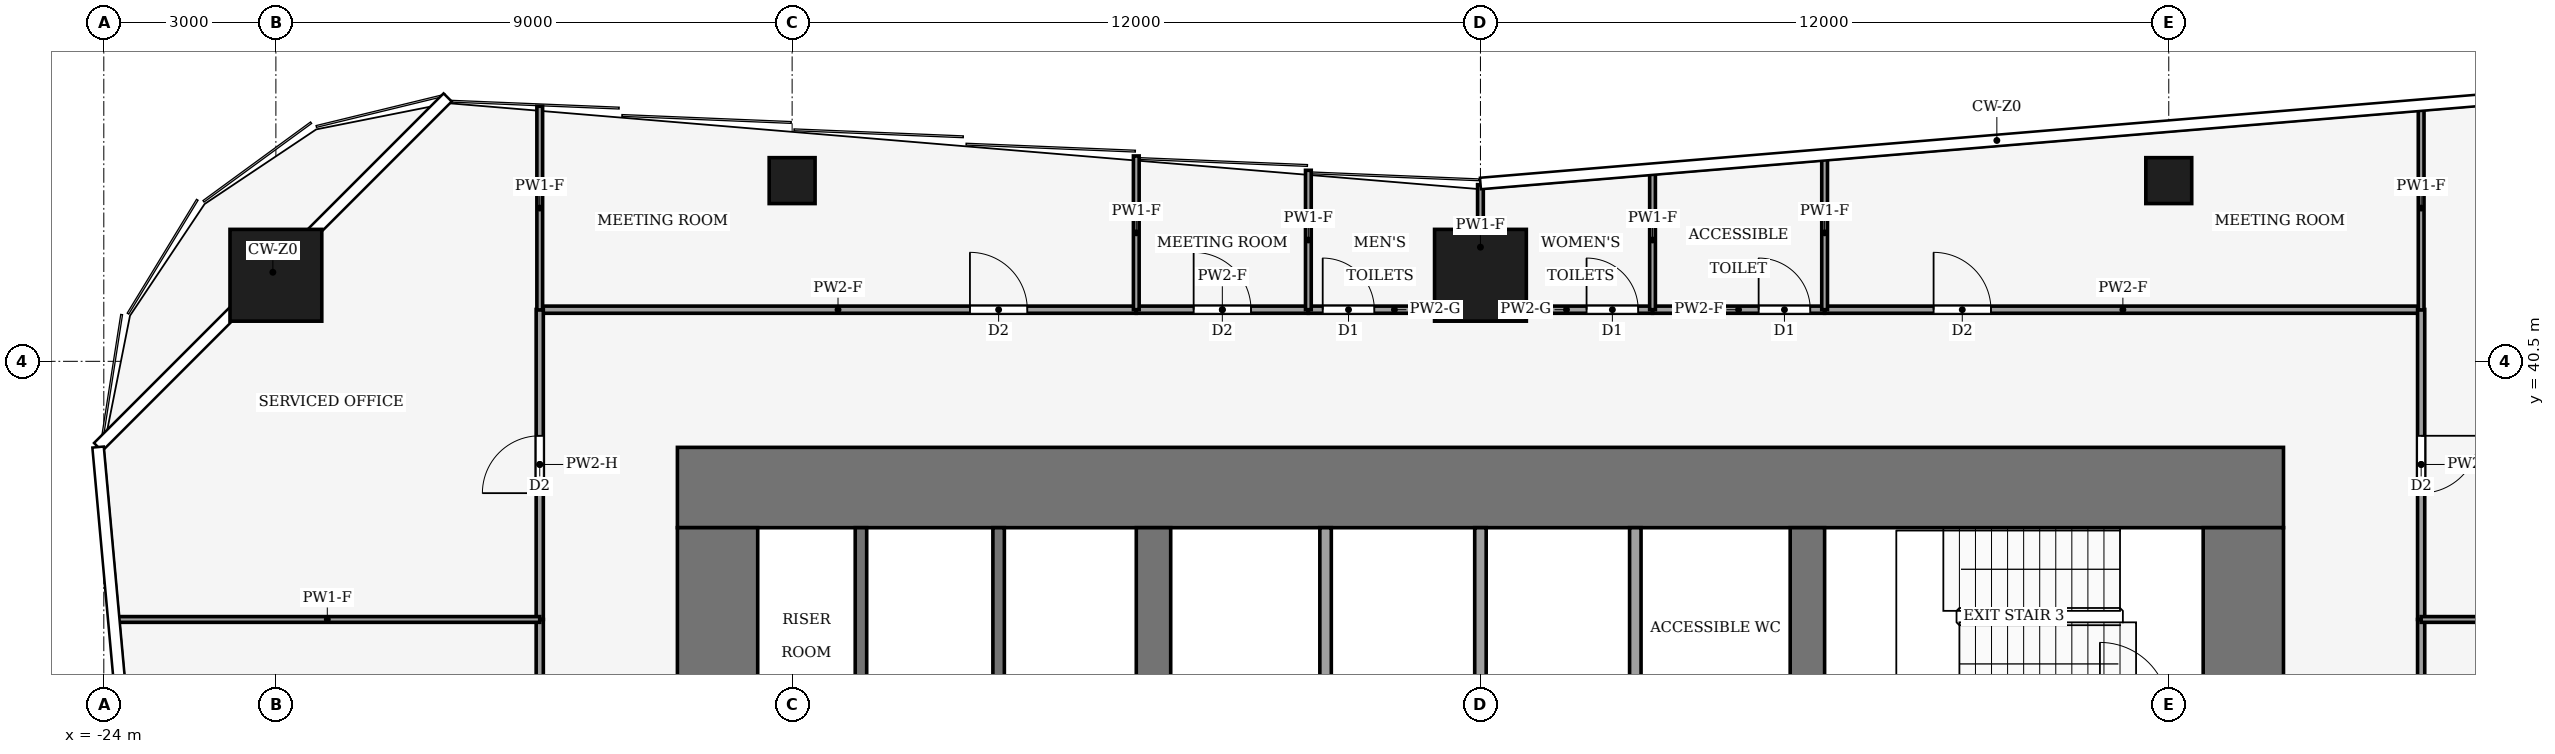
"""IFC4 building model, lengths in metres.
Left out: names, types, materials, properties, quantities, classifications, styles, units other than length and angle.
Written with IfcOpenShell. Run it as: python <this file> out.ifc"""

import sys

from ifc_helpers import new_model, si_unit, direction, frame, frame_2d, origin, origin_2d, place, context, subcontext, project, spatial, rectangle, hollow_rectangle, extrude, element, fill, save


model = new_model("IFC4")
c1 = context("Model", 3, precision=1e-05, world=origin(), true_north=direction((0.0, 1.0)))
c2 = subcontext(c1, "Body", "Model", "MODEL_VIEW")
j1 = project(units=[si_unit("LENGTHUNIT", "METRE"), si_unit("PLANEANGLEUNIT", "RADIAN")], contexts=[c1])
p1 = place(None, origin())
s1 = spatial("IfcSite", under=j1, at=p1, CompositionType="ELEMENT")
p2 = place(p1, origin())
s2 = spatial("IfcBuilding", under=s1, at=p2, CompositionType="ELEMENT")
p3 = place(p2, frame((0.0, 0.0, 30.0)))
s3 = spatial("IfcBuildingStorey", under=s2, at=p3, CompositionType="ELEMENT", Elevation=30.0)
p4 = place(p3, frame((-14.0, 38.3, -0.13), z_axis=(0.0, 0.0, 1.0), x_axis=(1.0, 0.0, 0.0)))
e1 = element("IfcWall", 1, at=p4, inside=s3, PredefinedType="SHEAR", context=c2, shape_type="SweptSolid", body=[
    extrude(rectangle(XDim=28.0, YDim=1.4, at=frame_2d((14.0, 0.0))), origin(), (0.0, 0.0, 1.0), 4.0),
])
p5 = place(p3, frame((-13.3, 18.4, -0.13), z_axis=(0.0, 0.0, 1.0), x_axis=(0.0, 1.0, 0.0)))
e2 = element("IfcWall", 2, at=p5, inside=s3, PredefinedType="SHEAR", context=c2, shape_type="SweptSolid", body=[
    extrude(rectangle(XDim=19.2, YDim=1.4, at=frame_2d((9.6, 0.0))), origin(), (0.0, 0.0, 1.0), 4.0),
])
p6 = place(p5, frame((2.8, 0.0, 0.13)))
e3 = element("IfcOpeningElement", 3, at=p6, cuts=e2, PredefinedType="OPENING", context=c2, shape_type="SweptSolid", body=[
    extrude(rectangle(XDim=2.4, YDim=2.4, at=frame_2d((1.2, 1.2))), frame((0.0, 0.71, 0.0), z_axis=(0.0, -1.0, 0.0), x_axis=(1.0, 0.0, 0.0)), (0.0, 0.0, 1.0), 1.42),
])
p7 = place(p5, frame((13.4, 0.0, 0.13)))
e4 = element("IfcOpeningElement", 4, at=p7, cuts=e2, PredefinedType="OPENING", context=c2, shape_type="SweptSolid", body=[
    extrude(rectangle(XDim=1.4, YDim=2.2, at=frame_2d((0.7, 1.1))), frame((0.0, 0.71, 0.0), z_axis=(0.0, -1.0, 0.0), x_axis=(1.0, 0.0, 0.0)), (0.0, 0.0, 1.0), 1.42),
])
p8 = place(p3, frame((13.3, 18.4, -0.13), z_axis=(0.0, 0.0, 1.0), x_axis=(0.0, 1.0, 0.0)))
e5 = element("IfcWall", 5, at=p8, inside=s3, PredefinedType="SHEAR", context=c2, shape_type="SweptSolid", body=[
    extrude(rectangle(XDim=19.2, YDim=1.4, at=frame_2d((9.6, 0.0))), origin(), (0.0, 0.0, 1.0), 4.0),
])
p9 = place(p8, frame((2.8, 0.0, 0.13)))
e6 = element("IfcOpeningElement", 6, at=p9, cuts=e5, PredefinedType="OPENING", context=c2, shape_type="SweptSolid", body=[
    extrude(rectangle(XDim=2.4, YDim=2.4, at=frame_2d((1.2, 1.2))), frame((0.0, 0.71, 0.0), z_axis=(0.0, -1.0, 0.0), x_axis=(1.0, 0.0, 0.0)), (0.0, 0.0, 1.0), 1.42),
])
p10 = place(p8, frame((13.3, 0.0, 0.13)))
e7 = element("IfcOpeningElement", 7, at=p10, cuts=e5, PredefinedType="OPENING", context=c2, shape_type="SweptSolid", body=[
    extrude(rectangle(XDim=2.4, YDim=2.4, at=frame_2d((1.2, 1.2))), frame((0.0, 0.71, 0.0), z_axis=(0.0, -1.0, 0.0), x_axis=(1.0, 0.0, 0.0)), (0.0, 0.0, 1.0), 1.42),
])
p11 = place(p3, frame((-5.7, 18.4, -0.13), z_axis=(0.0, 0.0, 1.0), x_axis=(0.0, 1.0, 0.0)))
e8 = element("IfcWall", 8, at=p11, inside=s3, PredefinedType="SHEAR", context=c2, shape_type="SweptSolid", body=[
    extrude(rectangle(XDim=19.2, YDim=0.6, at=frame_2d((9.6, 0.0))), origin(), (0.0, 0.0, 1.0), 4.0),
])
p12 = place(p11, frame((8.35, 0.0, 0.13)))
e9 = element("IfcOpeningElement", 9, at=p12, cuts=e8, PredefinedType="OPENING", context=c2, shape_type="SweptSolid", body=[
    extrude(rectangle(XDim=0.9, YDim=2.1, at=frame_2d((0.45, 1.05))), frame((0.0, 0.31, 0.0), z_axis=(0.0, -1.0, 0.0), x_axis=(1.0, 0.0, 0.0)), (0.0, 0.0, 1.0), 0.62),
])
p13 = place(p3, frame((5.7, 18.4, -0.13), z_axis=(0.0, 0.0, 1.0), x_axis=(0.0, 1.0, 0.0)))
e10 = element("IfcWall", 10, at=p13, inside=s3, PredefinedType="SHEAR", context=c2, shape_type="SweptSolid", body=[
    extrude(rectangle(XDim=19.2, YDim=0.6, at=frame_2d((9.6, 0.0))), origin(), (0.0, 0.0, 1.0), 4.0),
])
p14 = place(p13, frame((13.3, 0.0, 0.13)))
e11 = element("IfcOpeningElement", 11, at=p14, cuts=e10, PredefinedType="OPENING", context=c2, shape_type="SweptSolid", body=[
    extrude(rectangle(XDim=2.4, YDim=2.4, at=frame_2d((1.2, 1.2))), frame((0.0, 0.31, 0.0), z_axis=(0.0, -1.0, 0.0), x_axis=(1.0, 0.0, 0.0)), (0.0, 0.0, 1.0), 0.62),
])
for number, where, z_axis, x_axis in (
    (12, (-21.0, 42.0, 0.0), (0.0, 0.0, 1.0), (1.0, 0.0, 0.0)),
    (13, (0.0, 42.0, 0.0), (0.0, 0.0, 1.0), (1.0, 0.0, 0.0)),
):
    element("IfcColumn", number, at=place(p3, frame(where, z_axis=z_axis, x_axis=x_axis)), inside=s3, PredefinedType="COLUMN", context=c2, shape_type="SweptSolid", body=[
        extrude(hollow_rectangle(XDim=1.6, YDim=1.6, WallThickness=0.09, at=origin_2d()), origin(), (0.0, 0.0, 1.0), 4.0),
    ])
for number, where, z_axis, x_axis in (
    (14, (-12.0, 43.65, 0.0), (0.0, 0.0, 1.0), (1.0, 0.0, 0.0)),
    (15, (12.0, 43.65, 0.0), (0.0, 0.0, 1.0), (1.0, 0.0, 0.0)),
):
    element("IfcColumn", number, at=place(p3, frame(where, z_axis=z_axis, x_axis=x_axis)), inside=s3, PredefinedType="COLUMN", context=c2, shape_type="SweptSolid", body=[
        extrude(hollow_rectangle(XDim=0.8, YDim=0.8, WallThickness=0.04, at=origin_2d()), origin(), (0.0, 0.0, 1.0), 4.0),
    ])
for number, where, z_axis, x_axis in (
    (16, (-10.8, 34.0, 0.0), (0.0, 0.0, 1.0), (0.0, 1.0, 0.0)),
    (17, (-8.4, 34.0, 0.0), (0.0, 0.0, 1.0), (0.0, 1.0, 0.0)),
    (18, (-2.7, 34.0, 0.0), (0.0, 0.0, 1.0), (0.0, 1.0, 0.0)),
    (19, (0.0, 34.0, 0.0), (0.0, 0.0, 1.0), (0.0, 1.0, 0.0)),
    (20, (2.7, 34.0, 0.0), (0.0, 0.0, 1.0), (0.0, 1.0, 0.0)),
):
    element("IfcWall", number, at=place(p3, frame(where, z_axis=z_axis, x_axis=x_axis)), inside=s3, PredefinedType="PARTITIONING", context=c2, shape_type="SweptSolid", body=[
        extrude(rectangle(XDim=3.6, YDim=0.2, at=frame_2d((1.8, 0.0))), origin(), (0.0, 0.0, 1.0), 3.87),
    ])
p15 = place(p3, frame((-16.4, 41.4, 0.0), z_axis=(0.0, 0.0, 1.0), x_axis=(1.0, 0.0, 0.0)))
e21 = element("IfcWall", 21, at=p15, inside=s3, PredefinedType="PARTITIONING", context=c2, shape_type="SweptSolid", body=[
    extrude(rectangle(XDim=10.4, YDim=0.125, at=frame_2d((5.2, 0.0))), origin(), (0.0, 0.0, 1.0), 3.54),
])
p16 = place(p15, frame((7.5, 0.0, 0.0)))
e22 = element("IfcOpeningElement", 22, at=p16, cuts=e21, PredefinedType="OPENING", context=c2, shape_type="SweptSolid", body=[
    extrude(rectangle(XDim=1.0, YDim=2.1, at=frame_2d((0.5, 1.05))), frame((0.0, 0.073, 0.0), z_axis=(0.0, -1.0, 0.0), x_axis=(1.0, 0.0, 0.0)), (0.0, 0.0, 1.0), 0.145),
])
p17 = place(p3, frame((-6.0, 41.4, 0.0), z_axis=(0.0, 0.0, 1.0), x_axis=(1.0, 0.0, 0.0)))
e23 = element("IfcWall", 23, at=p17, inside=s3, PredefinedType="PARTITIONING", context=c2, shape_type="SweptSolid", body=[
    extrude(rectangle(XDim=3.0, YDim=0.125, at=frame_2d((1.5, 0.0))), origin(), (0.0, 0.0, 1.0), 3.54),
])
p18 = place(p17, frame((1.0, 0.0, 0.0)))
e24 = element("IfcOpeningElement", 24, at=p18, cuts=e23, PredefinedType="OPENING", context=c2, shape_type="SweptSolid", body=[
    extrude(rectangle(XDim=1.0, YDim=2.1, at=frame_2d((0.5, 1.05))), frame((0.0, 0.073, 0.0), z_axis=(0.0, -1.0, 0.0), x_axis=(1.0, 0.0, 0.0)), (0.0, 0.0, 1.0), 0.145),
])
p19 = place(p3, frame((-3.0, 41.4, 0.0), z_axis=(0.0, 0.0, 1.0), x_axis=(1.0, 0.0, 0.0)))
e25 = element("IfcWall", 25, at=p19, inside=s3, PredefinedType="PARTITIONING", context=c2, shape_type="SweptSolid", body=[
    extrude(rectangle(XDim=3.0, YDim=0.125, at=frame_2d((1.5, 0.0))), origin(), (0.0, 0.0, 1.0), 3.87),
])
p20 = place(p19, frame((0.25, 0.0, 0.0)))
e26 = element("IfcOpeningElement", 26, at=p20, cuts=e25, PredefinedType="OPENING", context=c2, shape_type="SweptSolid", body=[
    extrude(rectangle(XDim=0.9, YDim=2.1, at=frame_2d((0.45, 1.05))), frame((0.0, 0.073, 0.0), z_axis=(0.0, -1.0, 0.0), x_axis=(1.0, 0.0, 0.0)), (0.0, 0.0, 1.0), 0.145),
])
p21 = place(p3, frame((0.0, 41.4, 0.0), z_axis=(0.0, 0.0, 1.0), x_axis=(1.0, 0.0, 0.0)))
e27 = element("IfcWall", 27, at=p21, inside=s3, PredefinedType="PARTITIONING", context=c2, shape_type="SweptSolid", body=[
    extrude(rectangle(XDim=3.0, YDim=0.125, at=frame_2d((1.5, 0.0))), origin(), (0.0, 0.0, 1.0), 3.87),
])
p22 = place(p21, frame((1.85, 0.0, 0.0)))
e28 = element("IfcOpeningElement", 28, at=p22, cuts=e27, PredefinedType="OPENING", context=c2, shape_type="SweptSolid", body=[
    extrude(rectangle(XDim=0.9, YDim=2.1, at=frame_2d((0.45, 1.05))), frame((0.0, 0.073, 0.0), z_axis=(0.0, -1.0, 0.0), x_axis=(1.0, 0.0, 0.0)), (0.0, 0.0, 1.0), 0.145),
])
p23 = place(p3, frame((3.0, 41.4, 0.0), z_axis=(0.0, 0.0, 1.0), x_axis=(1.0, 0.0, 0.0)))
e29 = element("IfcWall", 29, at=p23, inside=s3, PredefinedType="PARTITIONING", context=c2, shape_type="SweptSolid", body=[
    extrude(rectangle(XDim=3.0, YDim=0.125, at=frame_2d((1.5, 0.0))), origin(), (0.0, 0.0, 1.0), 3.54),
])
p24 = place(p23, frame((1.85, 0.0, 0.0)))
e30 = element("IfcOpeningElement", 30, at=p24, cuts=e29, PredefinedType="OPENING", context=c2, shape_type="SweptSolid", body=[
    extrude(rectangle(XDim=0.9, YDim=2.1, at=frame_2d((0.45, 1.05))), frame((0.0, 0.073, 0.0), z_axis=(0.0, -1.0, 0.0), x_axis=(1.0, 0.0, 0.0)), (0.0, 0.0, 1.0), 0.145),
])
p25 = place(p3, frame((6.0, 41.4, 0.0), z_axis=(0.0, 0.0, 1.0), x_axis=(1.0, 0.0, 0.0)))
e31 = element("IfcWall", 31, at=p25, inside=s3, PredefinedType="PARTITIONING", context=c2, shape_type="SweptSolid", body=[
    extrude(rectangle(XDim=10.4, YDim=0.125, at=frame_2d((5.2, 0.0))), origin(), (0.0, 0.0, 1.0), 3.54),
])
p26 = place(p25, frame((1.9, 0.0, 0.0)))
e32 = element("IfcOpeningElement", 32, at=p26, cuts=e31, PredefinedType="OPENING", context=c2, shape_type="SweptSolid", body=[
    extrude(rectangle(XDim=1.0, YDim=2.1, at=frame_2d((0.5, 1.05))), frame((0.0, 0.073, 0.0), z_axis=(0.0, -1.0, 0.0), x_axis=(1.0, 0.0, 0.0)), (0.0, 0.0, 1.0), 0.145),
])
p27 = place(p3, frame((-16.4, 24.0, 0.0), z_axis=(0.0, 0.0, 1.0), x_axis=(0.0, 1.0, 0.0)))
e33 = element("IfcWall", 33, at=p27, inside=s3, PredefinedType="PARTITIONING", context=c2, shape_type="SweptSolid", body=[
    extrude(rectangle(XDim=12.0, YDim=0.125, at=frame_2d((6.0, 0.0))), origin(), (0.0, 0.0, 1.0), 3.48),
])
p28 = place(p27, frame((5.5, 0.0, 0.0)))
e34 = element("IfcOpeningElement", 34, at=p28, cuts=e33, PredefinedType="OPENING", context=c2, shape_type="SweptSolid", body=[
    extrude(rectangle(XDim=1.0, YDim=2.1, at=frame_2d((0.5, 1.05))), frame((0.0, 0.073, 0.0), z_axis=(0.0, -1.0, 0.0), x_axis=(1.0, 0.0, 0.0)), (0.0, 0.0, 1.0), 0.145),
])
p29 = place(p3, frame((-16.4, 36.0, 0.0), z_axis=(0.0, 0.0, 1.0), x_axis=(0.0, 1.0, 0.0)))
e35 = element("IfcWall", 35, at=p29, inside=s3, PredefinedType="PARTITIONING", context=c2, shape_type="SweptSolid", body=[
    extrude(rectangle(XDim=5.404, YDim=0.125, at=frame_2d((2.702, 0.0))), origin(), (0.0, 0.0, 1.0), 3.14),
])
p30 = place(p29, frame((2.202, 0.0, 0.0)))
e36 = element("IfcOpeningElement", 36, at=p30, cuts=e35, PredefinedType="OPENING", context=c2, shape_type="SweptSolid", body=[
    extrude(rectangle(XDim=1.0, YDim=2.1, at=frame_2d((0.5, 1.05))), frame((0.0, 0.073, 0.0), z_axis=(0.0, -1.0, 0.0), x_axis=(1.0, 0.0, 0.0)), (0.0, 0.0, 1.0), 0.145),
])
p31 = place(p3, frame((16.4, 36.0, 0.0), z_axis=(0.0, 0.0, 1.0), x_axis=(0.0, -1.0, 0.0)))
e37 = element("IfcWall", 37, at=p31, inside=s3, PredefinedType="PARTITIONING", context=c2, shape_type="SweptSolid", body=[
    extrude(rectangle(XDim=3.0, YDim=0.125, at=frame_2d((1.5, 0.0))), origin(), (0.0, 0.0, 1.0), 3.48),
])
p32 = place(p31, frame((1.0, 0.0, 0.0)))
e38 = element("IfcOpeningElement", 38, at=p32, cuts=e37, PredefinedType="OPENING", context=c2, shape_type="SweptSolid", body=[
    extrude(rectangle(XDim=1.0, YDim=2.1, at=frame_2d((0.5, 1.05))), frame((0.0, 0.073, 0.0), z_axis=(0.0, -1.0, 0.0), x_axis=(1.0, 0.0, 0.0)), (0.0, 0.0, 1.0), 0.145),
])
p33 = place(p3, frame((16.4, 41.404, 0.0), z_axis=(0.0, 0.0, 1.0), x_axis=(0.0, -1.0, 0.0)))
e39 = element("IfcWall", 39, at=p33, inside=s3, PredefinedType="PARTITIONING", context=c2, shape_type="SweptSolid", body=[
    extrude(rectangle(XDim=5.404, YDim=0.125, at=frame_2d((2.702, 0.0))), origin(), (0.0, 0.0, 1.0), 3.14),
])
p34 = place(p33, frame((2.202, 0.0, 0.0)))
e40 = element("IfcOpeningElement", 40, at=p34, cuts=e39, PredefinedType="OPENING", context=c2, shape_type="SweptSolid", body=[
    extrude(rectangle(XDim=1.0, YDim=2.1, at=frame_2d((0.5, 1.05))), frame((0.0, 0.073, 0.0), z_axis=(0.0, -1.0, 0.0), x_axis=(1.0, 0.0, 0.0)), (0.0, 0.0, 1.0), 0.145),
])
p35 = place(p3, frame((-6.0, 41.4, 0.0), z_axis=(0.0, 0.0, 1.0), x_axis=(0.0, 1.0, 0.0)))
e41 = element("IfcWall", 41, at=p35, inside=s3, PredefinedType="PARTITIONING", context=c2, shape_type="SweptSolid", body=[
    extrude(rectangle(XDim=2.68, YDim=0.1, at=frame_2d((1.34, 0.0))), origin(), (0.0, 0.0, 1.0), 3.04),
])
p36 = place(p3, frame((-16.4, 44.947, 0.0), z_axis=(0.0, 0.0, 1.0), x_axis=(0.0, -1.0, 0.0)))
e42 = element("IfcWall", 42, at=p36, inside=s3, PredefinedType="PARTITIONING", context=c2, shape_type="SweptSolid", body=[
    extrude(rectangle(XDim=3.551, YDim=0.1, at=frame_2d((1.775, 0.0))), origin(), (0.0, 0.0, 1.0), 3.04),
])
p37 = place(p3, frame((-3.0, 41.4, 0.0), z_axis=(0.0, 0.0, 1.0), x_axis=(0.0, 1.0, 0.0)))
e43 = element("IfcWall", 43, at=p37, inside=s3, PredefinedType="PARTITIONING", context=c2, shape_type="SweptSolid", body=[
    extrude(rectangle(XDim=2.43, YDim=0.1, at=frame_2d((1.215, 0.0))), origin(), (0.0, 0.0, 1.0), 3.04),
])
p38 = place(p3, frame((0.0, 41.4, 0.0), z_axis=(0.0, 0.0, 1.0), x_axis=(0.0, 1.0, 0.0)))
e44 = element("IfcWall", 44, at=p38, inside=s3, PredefinedType="PARTITIONING", context=c2, shape_type="SweptSolid", body=[
    extrude(rectangle(XDim=2.18, YDim=0.1, at=frame_2d((1.09, 0.0))), origin(), (0.0, 0.0, 1.0), 3.04),
])
p39 = place(p3, frame((3.0, 41.4, 0.0), z_axis=(0.0, 0.0, 1.0), x_axis=(0.0, 1.0, 0.0)))
e45 = element("IfcWall", 45, at=p39, inside=s3, PredefinedType="PARTITIONING", context=c2, shape_type="SweptSolid", body=[
    extrude(rectangle(XDim=2.43, YDim=0.1, at=frame_2d((1.215, 0.0))), origin(), (0.0, 0.0, 1.0), 3.04),
])
p40 = place(p3, frame((6.0, 41.4, 0.0), z_axis=(0.0, 0.0, 1.0), x_axis=(0.0, 1.0, 0.0)))
e46 = element("IfcWall", 46, at=p40, inside=s3, PredefinedType="PARTITIONING", context=c2, shape_type="SweptSolid", body=[
    extrude(rectangle(XDim=2.68, YDim=0.1, at=frame_2d((1.34, 0.0))), origin(), (0.0, 0.0, 1.0), 3.04),
])
p41 = place(p3, frame((16.4, 41.396, 0.0), z_axis=(0.0, 0.0, 1.0), x_axis=(0.0, 1.0, 0.0)))
e47 = element("IfcWall", 47, at=p41, inside=s3, PredefinedType="PARTITIONING", context=c2, shape_type="SweptSolid", body=[
    extrude(rectangle(XDim=3.551, YDim=0.1, at=frame_2d((1.775, 0.0))), origin(), (0.0, 0.0, 1.0), 3.04),
])
for number, where, z_axis, x_axis in (
    (48, (-16.4, 36.0, 0.0), (0.0, 0.0, 1.0), (-1.0, 0.0, 0.0)),
    (49, (23.807, 36.0, 0.0), (0.0, 0.0, 1.0), (-1.0, 0.0, 0.0)),
):
    element("IfcWall", number, at=place(p3, frame(where, z_axis=z_axis, x_axis=x_axis)), inside=s3, PredefinedType="PARTITIONING", context=c2, shape_type="SweptSolid", body=[
        extrude(rectangle(XDim=7.407, YDim=0.1, at=frame_2d((3.704, 0.0))), origin(), (0.0, 0.0, 1.0), 3.04),
    ])
p42 = place(p16, origin())
e50 = element("IfcDoor", 50, at=p42, inside=s3, OperationType="SINGLE_SWING_RIGHT", PredefinedType="DOOR", context=c2, shape_type="SweptSolid", body=[
    extrude(rectangle(XDim=1.0, YDim=2.1, at=frame_2d((0.5, 1.05))), frame((0.0, 0.025, 0.0), z_axis=(0.0, -1.0, 0.0), x_axis=(1.0, 0.0, 0.0)), (0.0, 0.0, 1.0), 0.05),
])
fill(e22, e50)
p43 = place(p18, origin())
e51 = element("IfcDoor", 51, at=p43, inside=s3, OperationType="SINGLE_SWING_LEFT", PredefinedType="DOOR", context=c2, shape_type="SweptSolid", body=[
    extrude(rectangle(XDim=1.0, YDim=2.1, at=frame_2d((0.5, 1.05))), frame((0.0, 0.025, 0.0), z_axis=(0.0, -1.0, 0.0), x_axis=(1.0, 0.0, 0.0)), (0.0, 0.0, 1.0), 0.05),
])
fill(e24, e51)
p44 = place(p20, origin())
e52 = element("IfcDoor", 52, at=p44, inside=s3, OperationType="SINGLE_SWING_LEFT", PredefinedType="DOOR", context=c2, shape_type="SweptSolid", body=[
    extrude(rectangle(XDim=0.9, YDim=2.1, at=frame_2d((0.45, 1.05))), frame((0.0, 0.025, 0.0), z_axis=(0.0, -1.0, 0.0), x_axis=(1.0, 0.0, 0.0)), (0.0, 0.0, 1.0), 0.05),
])
fill(e26, e52)
p45 = place(p22, origin())
e53 = element("IfcDoor", 53, at=p45, inside=s3, OperationType="SINGLE_SWING_RIGHT", PredefinedType="DOOR", context=c2, shape_type="SweptSolid", body=[
    extrude(rectangle(XDim=0.9, YDim=2.1, at=frame_2d((0.45, 1.05))), frame((0.0, 0.025, 0.0), z_axis=(0.0, -1.0, 0.0), x_axis=(1.0, 0.0, 0.0)), (0.0, 0.0, 1.0), 0.05),
])
fill(e28, e53)
p46 = place(p24, origin())
e54 = element("IfcDoor", 54, at=p46, inside=s3, OperationType="SINGLE_SWING_RIGHT", PredefinedType="DOOR", context=c2, shape_type="SweptSolid", body=[
    extrude(rectangle(XDim=0.9, YDim=2.1, at=frame_2d((0.45, 1.05))), frame((0.0, 0.025, 0.0), z_axis=(0.0, -1.0, 0.0), x_axis=(1.0, 0.0, 0.0)), (0.0, 0.0, 1.0), 0.05),
])
fill(e30, e54)
p47 = place(p26, origin())
e55 = element("IfcDoor", 55, at=p47, inside=s3, OperationType="SINGLE_SWING_LEFT", PredefinedType="DOOR", context=c2, shape_type="SweptSolid", body=[
    extrude(rectangle(XDim=1.0, YDim=2.1, at=frame_2d((0.5, 1.05))), frame((0.0, 0.025, 0.0), z_axis=(0.0, -1.0, 0.0), x_axis=(1.0, 0.0, 0.0)), (0.0, 0.0, 1.0), 0.05),
])
fill(e32, e55)
p48 = place(p30, origin())
e56 = element("IfcDoor", 56, at=p48, inside=s3, OperationType="SINGLE_SWING_RIGHT", PredefinedType="DOOR", context=c2, shape_type="SweptSolid", body=[
    extrude(rectangle(XDim=1.0, YDim=2.1, at=frame_2d((0.5, 1.05))), frame((0.0, 0.025, 0.0), z_axis=(0.0, -1.0, 0.0), x_axis=(1.0, 0.0, 0.0)), (0.0, 0.0, 1.0), 0.05),
])
fill(e36, e56)
p49 = place(p34, origin())
e57 = element("IfcDoor", 57, at=p49, inside=s3, OperationType="SINGLE_SWING_LEFT", PredefinedType="DOOR", context=c2, shape_type="SweptSolid", body=[
    extrude(rectangle(XDim=1.0, YDim=2.1, at=frame_2d((0.5, 1.05))), frame((0.0, 0.025, 0.0), z_axis=(0.0, -1.0, 0.0), x_axis=(1.0, 0.0, 0.0)), (0.0, 0.0, 1.0), 0.05),
])
fill(e40, e57)
save(model, sys.argv[1])
